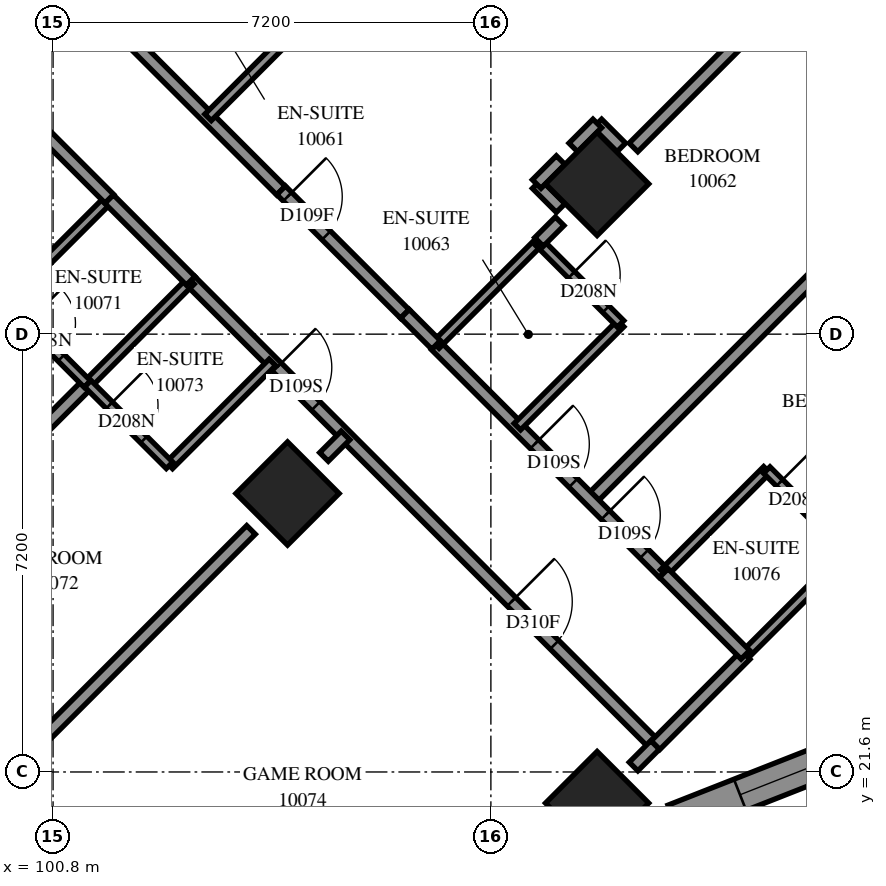
"""IFC4 building model, lengths in metres.
Left out: names, types, materials, properties, quantities, classifications, styles, units other than length and angle.
Written with IfcOpenShell. Run it as: python <this file> out.ifc"""

import sys

from ifc_helpers import new_model, si_unit, direction, frame, frame_2d, origin, origin_2d, place, context, subcontext, project, spatial, polyline, rectangle, outline, extrude, element, fill, save


model = new_model("IFC4")
c1 = context("Model", 3, precision=1e-05, world=origin(), true_north=direction((0.0, 1.0)))
c2 = subcontext(c1, "Body", "Model", "MODEL_VIEW")
j1 = project(units=[si_unit("LENGTHUNIT", "METRE"), si_unit("PLANEANGLEUNIT", "RADIAN")], contexts=[c1])
p1 = place(None, origin())
s1 = spatial("IfcSite", under=j1, at=p1, CompositionType="ELEMENT")
p2 = place(p1, origin())
s2 = spatial("IfcBuilding", under=s1, at=p2, CompositionType="ELEMENT")
p3 = place(p2, frame((0.0, 0.0, 40.6)))
s3 = spatial("IfcBuildingStorey", under=s2, at=p3, CompositionType="ELEMENT", Elevation=40.6)
for number, where, z_axis, x_axis in (
    (1, (109.747, 31.271, 0.0), (0.0, 0.0, 1.0), (0.707, -0.707, 0.0)),
    (2, (104.656, 26.18, 0.0), (0.0, 0.0, 1.0), (0.707, -0.707, 0.0)),
    (3, (109.747, 21.088, 0.0), (0.0, 0.0, 1.0), (0.707, -0.707, 0.0)),
):
    element("IfcColumn", number, at=place(p3, frame(where, z_axis=z_axis, x_axis=x_axis)), inside=s3, PredefinedType="COLUMN", context=c2, shape_type="SweptSolid", body=[
        extrude(rectangle(XDim=1.2, YDim=1.2, at=origin_2d()), origin(), (0.0, 0.0, 1.0), 3.1),
    ])
p4 = place(p3, frame((111.012, 20.798, 0.0), z_axis=(0.0, 0.0, 1.0), x_axis=(0.9305394819, 0.3661915791, 0.0)))
e4 = element("IfcWall", 4, at=p4, inside=s3, PredefinedType="SOLIDWALL", context=c2, shape_type="SweptSolid", body=[
    extrude(outline(polyline([(0.12, -0.275), (5.633, -0.275), (5.383, 0.275), (-0.12, 0.275), (0.12, -0.275)])), origin(), (0.0, 0.0, 1.0), 3.1),
])
p5 = place(p4, frame((1.166, 0.0, 0.5)))
e5 = element("IfcOpeningElement", 5, at=p5, cuts=e4, PredefinedType="OPENING", context=c2, shape_type="SweptSolid", body=[
    extrude(rectangle(XDim=2.8, YDim=2.45, at=frame_2d((1.4, 1.225))), frame((0.0, 0.285, 0.0), z_axis=(0.0, -1.0, 0.0), x_axis=(1.0, 0.0, 0.0)), (0.0, 0.0, 1.0), 0.57),
])
p6 = place(p3, frame((103.061, 29.677, 0.0), z_axis=(0.0, 0.0, 1.0), x_axis=(0.7071067812, -0.7071067812, 0.0)))
e6 = element("IfcWall", 6, at=p6, inside=s3, PredefinedType="PARTITIONING", context=c2, shape_type="SweptSolid", body=[
    extrude(rectangle(XDim=10.802, YDim=0.2, at=frame_2d((5.401, 0.0))), origin(), (0.0, 0.0, 1.0), 3.1),
])
p7 = place(p6, frame((2.012, 0.0, 0.0)))
e7 = element("IfcOpeningElement", 7, at=p7, cuts=e6, PredefinedType="OPENING", context=c2, shape_type="SweptSolid", body=[
    extrude(rectangle(XDim=0.9, YDim=2.1, at=frame_2d((0.45, 1.05))), frame((0.0, 0.11, 0.0), z_axis=(0.0, -1.0, 0.0), x_axis=(1.0, 0.0, 0.0)), (0.0, 0.0, 1.0), 0.22),
])
p8 = place(p6, frame((7.463, 0.0, 0.0)))
e8 = element("IfcOpeningElement", 8, at=p8, cuts=e6, PredefinedType="OPENING", context=c2, shape_type="SweptSolid", body=[
    extrude(rectangle(XDim=1.0, YDim=2.1, at=frame_2d((0.5, 1.05))), frame((0.0, 0.11, 0.0), z_axis=(0.0, -1.0, 0.0), x_axis=(1.0, 0.0, 0.0)), (0.0, 0.0, 1.0), 0.22),
])
p9 = place(p3, frame((99.455, 36.253, 0.0), z_axis=(0.0, 0.0, 1.0), x_axis=(0.7071067812, -0.7071067812, 0.0)))
e9 = element("IfcWall", 9, at=p9, inside=s3, PredefinedType="PARTITIONING", context=c2, shape_type="SweptSolid", body=[
    extrude(rectangle(XDim=7.201, YDim=0.2, at=frame_2d((3.601, 0.0))), origin(), (0.0, 0.0, 1.0), 3.1),
])
p10 = place(p9, frame((0.401, 0.0, 0.0)))
e10 = element("IfcOpeningElement", 10, at=p10, cuts=e9, PredefinedType="OPENING", context=c2, shape_type="SweptSolid", body=[
    extrude(rectangle(XDim=0.9, YDim=2.1, at=frame_2d((0.45, 1.05))), frame((0.0, 0.11, 0.0), z_axis=(0.0, -1.0, 0.0), x_axis=(1.0, 0.0, 0.0)), (0.0, 0.0, 1.0), 0.22),
])
p11 = place(p3, frame((96.532, 23.148, 0.0), z_axis=(0.0, 0.0, 1.0), x_axis=(0.7071140939, 0.7070994684, 0.0)))
e11 = element("IfcWall", 11, at=p11, inside=s3, PredefinedType="PARTITIONING", context=c2, shape_type="SweptSolid", body=[
    extrude(rectangle(XDim=6.837, YDim=0.2, at=frame_2d((3.419, 0.0))), origin(), (0.0, 0.0, 1.0), 3.1),
])
p12 = place(p3, frame((109.64, 26.074, 0.0), z_axis=(0.0, 0.0, 1.0), x_axis=(0.7072538194, 0.7069597124, 0.0)))
e12 = element("IfcWall", 12, at=p12, inside=s3, PredefinedType="PARTITIONING", context=c2, shape_type="SweptSolid", body=[
    extrude(rectangle(XDim=6.8, YDim=0.2, at=frame_2d((3.4, 0.0))), origin(), (0.0, 0.0, 1.0), 3.1),
])
for number, where, z_axis, x_axis in (
    (13, (110.345, 31.871, 0.0), (0.0, 0.0, 1.0), (0.707, 0.707, 0.0)),
    (14, (100.163, 21.689, 0.0), (0.0, 0.0, 1.0), (0.707, 0.707, 0.0)),
):
    element("IfcWall", number, at=place(p3, frame(where, z_axis=z_axis, x_axis=x_axis)), inside=s3, PredefinedType="PARTITIONING", context=c2, shape_type="SweptSolid", body=[
        extrude(rectangle(XDim=5.504, YDim=0.2, at=frame_2d((2.752, 0.0))), origin(), (0.0, 0.0, 1.0), 3.1),
    ])
p13 = place(p3, frame((107.093, 28.615, 0.0), z_axis=(0.0, 0.0, 1.0), x_axis=(0.7072011313, -0.7070124185, 0.0)))
e15 = element("IfcWall", 15, at=p13, inside=s3, PredefinedType="PARTITIONING", context=c2, shape_type="SweptSolid", body=[
    extrude(rectangle(XDim=5.299, YDim=0.2, at=frame_2d((2.65, 0.0))), origin(), (0.0, 0.0, 1.0), 3.1),
])
p14 = place(p13, frame((2.299, 0.0, 0.0)))
e16 = element("IfcOpeningElement", 16, at=p14, cuts=e15, PredefinedType="OPENING", context=c2, shape_type="SweptSolid", body=[
    extrude(rectangle(XDim=0.9, YDim=2.1, at=frame_2d((0.45, 1.05))), frame((0.0, 0.11, 0.0), z_axis=(0.0, -1.0, 0.0), x_axis=(1.0, 0.0, 0.0)), (0.0, 0.0, 1.0), 0.22),
])
p15 = place(p13, frame((3.949, 0.0, 0.0)))
e17 = element("IfcOpeningElement", 17, at=p15, cuts=e15, PredefinedType="OPENING", context=c2, shape_type="SweptSolid", body=[
    extrude(rectangle(XDim=0.9, YDim=2.1, at=frame_2d((0.45, 1.05))), frame((0.0, 0.11, 0.0), z_axis=(0.0, -1.0, 0.0), x_axis=(1.0, 0.0, 0.0)), (0.0, 0.0, 1.0), 0.22),
])
p16 = place(p3, frame((104.551, 31.165, 0.0), z_axis=(0.0, 0.0, 1.0), x_axis=(0.7074545101, -0.7067588812, 0.0)))
e18 = element("IfcWall", 18, at=p16, inside=s3, PredefinedType="PARTITIONING", context=c2, shape_type="SweptSolid", body=[
    extrude(rectangle(XDim=2.875, YDim=0.2, at=frame_2d((1.438, 0.0))), origin(), (0.0, 0.0, 1.0), 3.1),
])
p17 = place(p16, frame((0.148, 0.0, 0.0)))
e19 = element("IfcOpeningElement", 19, at=p17, cuts=e18, PredefinedType="OPENING", context=c2, shape_type="SweptSolid", body=[
    extrude(rectangle(XDim=0.9, YDim=2.1, at=frame_2d((0.45, 1.05))), frame((0.0, 0.11, 0.0), z_axis=(0.0, -1.0, 0.0), x_axis=(1.0, 0.0, 0.0)), (0.0, 0.0, 1.0), 0.22),
])
p18 = place(p3, frame((100.023, 29.327, 0.0), z_axis=(0.0, 0.0, 1.0), x_axis=(0.7071067812, 0.7071067812, 0.0)))
e20 = element("IfcWall", 20, at=p18, inside=s3, PredefinedType="PARTITIONING", context=c2, shape_type="SweptSolid", body=[
    extrude(rectangle(XDim=2.401, YDim=0.15, at=frame_2d((1.201, 0.0))), origin(), (0.0, 0.0, 1.0), 3.1),
])
for number, where, z_axis, x_axis in (
    (21, (101.371, 27.979, 0.0), (0.0, 0.0, 1.0), (0.707, 0.708, 0.0)),
    (22, (108.435, 27.279, 0.0), (0.0, 0.0, 1.0), (0.708, 0.707, 0.0)),
    (23, (103.349, 32.365, 0.0), (0.0, 0.0, 1.0), (0.707, 0.708, 0.0)),
):
    element("IfcWall", number, at=place(p3, frame(where, z_axis=z_axis, x_axis=x_axis)), inside=s3, PredefinedType="PARTITIONING", context=c2, shape_type="SweptSolid", body=[
        extrude(rectangle(XDim=2.4, YDim=0.15, at=frame_2d((1.2, 0.0))), origin(), (0.0, 0.0, 1.0), 3.1),
    ])
p19 = place(p3, frame((112.183, 23.531, 0.0), z_axis=(0.0, 0.0, 1.0), x_axis=(0.7075233388, 0.706689978, 0.0)))
e24 = element("IfcWall", 24, at=p19, inside=s3, PredefinedType="PARTITIONING", context=c2, shape_type="SweptSolid", body=[
    extrude(rectangle(XDim=2.4, YDim=0.15, at=frame_2d((1.2, 0.0))), origin(), (0.0, 0.0, 1.0), 2.6),
])
for number, where, z_axis, x_axis in (
    (25, (102.711, 26.641, 0.0), (0.0, 0.0, 1.0), (0.707, 0.707, 0.0)),
    (26, (107.095, 28.621, 0.0), (0.0, 0.0, 1.0), (0.707, 0.707, 0.0)),
    (27, (110.843, 24.873, 0.0), (0.0, 0.0, 1.0), (0.707, 0.707, 0.0)),
):
    element("IfcWall", number, at=place(p3, frame(where, z_axis=z_axis, x_axis=x_axis)), inside=s3, PredefinedType="PARTITIONING", context=c2, shape_type="SweptSolid", body=[
        extrude(rectangle(XDim=2.398, YDim=0.15, at=frame_2d((1.199, 0.0))), origin(), (0.0, 0.0, 1.0), 3.1),
    ])
p20 = place(p3, frame((110.705, 22.039, 0.0), z_axis=(0.0, 0.0, 1.0), x_axis=(0.7066304548, 0.7075827869, 0.0)))
e28 = element("IfcWall", 28, at=p20, inside=s3, PredefinedType="PARTITIONING", context=c2, shape_type="SweptSolid", body=[
    extrude(rectangle(XDim=2.1, YDim=0.2, at=frame_2d((1.05, 0.0))), origin(), (0.0, 0.0, 1.0), 2.6),
])
p21 = place(p3, frame((100.021, 29.323, 0.0), z_axis=(0.0, 0.0, 1.0), x_axis=(0.7071067812, -0.7071067812, 0.0)))
e29 = element("IfcWall", 29, at=p21, inside=s3, PredefinedType="PARTITIONING", context=c2, shape_type="SweptSolid", body=[
    extrude(rectangle(XDim=1.901, YDim=0.15, at=frame_2d((0.95, 0.0))), origin(), (0.0, 0.0, 1.0), 3.1),
])
p22 = place(p21, frame((0.491, 0.0, 0.0)))
e30 = element("IfcOpeningElement", 30, at=p22, cuts=e29, PredefinedType="OPENING", context=c2, shape_type="SweptSolid", body=[
    extrude(rectangle(XDim=0.8, YDim=2.1, at=frame_2d((0.4, 1.05))), frame((0.0, 0.085, 0.0), z_axis=(0.0, -1.0, 0.0), x_axis=(1.0, 0.0, 0.0)), (0.0, 0.0, 1.0), 0.17),
])
p23 = place(p3, frame((108.789, 30.313, 0.0), z_axis=(0.0, 0.0, 1.0), x_axis=(0.7071067812, -0.7071067812, 0.0)))
e31 = element("IfcWall", 31, at=p23, inside=s3, PredefinedType="PARTITIONING", context=c2, shape_type="SweptSolid", body=[
    extrude(rectangle(XDim=1.901, YDim=0.15, at=frame_2d((0.95, 0.0))), origin(), (0.0, 0.0, 1.0), 3.1),
])
p24 = place(p23, frame((0.76, 0.0, 0.0)))
e32 = element("IfcOpeningElement", 32, at=p24, cuts=e31, PredefinedType="OPENING", context=c2, shape_type="SweptSolid", body=[
    extrude(rectangle(XDim=0.8, YDim=2.1, at=frame_2d((0.4, 1.05))), frame((0.0, 0.085, 0.0), z_axis=(0.0, -1.0, 0.0), x_axis=(1.0, 0.0, 0.0)), (0.0, 0.0, 1.0), 0.17),
])
p25 = place(p3, frame((112.537, 26.565, 0.0), z_axis=(0.0, 0.0, 1.0), x_axis=(0.7071067812, -0.7071067812, 0.0)))
e33 = element("IfcWall", 33, at=p25, inside=s3, PredefinedType="PARTITIONING", context=c2, shape_type="SweptSolid", body=[
    extrude(rectangle(XDim=1.901, YDim=0.15, at=frame_2d((0.95, 0.0))), origin(), (0.0, 0.0, 1.0), 3.1),
])
p26 = place(p25, frame((0.297, 0.0, 0.0)))
e34 = element("IfcOpeningElement", 34, at=p26, cuts=e33, PredefinedType="OPENING", context=c2, shape_type="SweptSolid", body=[
    extrude(rectangle(XDim=0.8, YDim=2.1, at=frame_2d((0.4, 1.05))), frame((0.0, 0.085, 0.0), z_axis=(0.0, -1.0, 0.0), x_axis=(1.0, 0.0, 0.0)), (0.0, 0.0, 1.0), 0.17),
])
p27 = place(p3, frame((110.843, 24.871, 0.0), z_axis=(0.0, 0.0, 1.0), x_axis=(0.7065800724, -0.7076330979, 0.0)))
e35 = element("IfcWall", 35, at=p27, inside=s3, PredefinedType="PARTITIONING", context=c2, shape_type="SweptSolid", body=[
    extrude(rectangle(XDim=1.899, YDim=0.2, at=frame_2d((0.95, 0.0))), origin(), (0.0, 0.0, 1.0), 3.1),
])
p28 = place(p3, frame((101.371, 27.985, 0.0), z_axis=(0.0, 0.0, 1.0), x_axis=(0.7076330979, -0.7065800724, 0.0)))
e36 = element("IfcWall", 36, at=p28, inside=s3, PredefinedType="PARTITIONING", context=c2, shape_type="SweptSolid", body=[
    extrude(rectangle(XDim=1.899, YDim=0.15, at=frame_2d((0.95, 0.0))), origin(), (0.0, 0.0, 1.0), 3.1),
])
p29 = place(p28, frame((0.501, 0.0, 0.0)))
e37 = element("IfcOpeningElement", 37, at=p29, cuts=e36, PredefinedType="OPENING", context=c2, shape_type="SweptSolid", body=[
    extrude(rectangle(XDim=0.8, YDim=2.1, at=frame_2d((0.4, 1.05))), frame((0.0, 0.085, 0.0), z_axis=(0.0, -1.0, 0.0), x_axis=(1.0, 0.0, 0.0)), (0.0, 0.0, 1.0), 0.17),
])
p30 = place(p3, frame((101.72, 31.022, 0.0), z_axis=(0.0, 0.0, 1.0), x_axis=(0.7065800724, -0.7076330979, 0.0)))
e38 = element("IfcWall", 38, at=p30, inside=s3, PredefinedType="PARTITIONING", context=c2, shape_type="SweptSolid", body=[
    extrude(rectangle(XDim=1.899, YDim=0.2, at=frame_2d((0.95, 0.0))), origin(), (0.0, 0.0, 1.0), 3.1),
])
p31 = place(p3, frame((100.523, 32.229, 0.0), z_axis=(0.0, 0.0, 1.0), x_axis=(0.7071067812, -0.7071067812, 0.0)))
e39 = element("IfcWall", 39, at=p31, inside=s3, PredefinedType="PARTITIONING", context=c2, shape_type="SweptSolid", body=[
    extrude(rectangle(XDim=1.7, YDim=0.2, at=frame_2d((0.85, 0.0))), origin(), (0.0, 0.0, 1.0), 3.1),
])
p32 = place(p3, frame((106.587, 29.135, 0.0), z_axis=(0.0, 0.0, 1.0), x_axis=(0.7071067812, -0.7071067812, 0.0)))
e40 = element("IfcWall", 40, at=p32, inside=s3, PredefinedType="PARTITIONING", context=c2, shape_type="SweptSolid", body=[
    extrude(rectangle(XDim=0.724, YDim=0.2, at=frame_2d((0.362, 0.0))), origin(), (0.0, 0.0, 1.0), 3.1),
])
for number, where, z_axis, x_axis in (
    (41, (108.754, 31.268, 0.0), (0.0, 0.0, 1.0), (0.707, -0.707, 0.0)),
    (42, (109.751, 32.265, 0.0), (0.0, 0.0, 1.0), (0.707, -0.707, 0.0)),
    (43, (109.355, 31.871, 0.0), (0.0, 0.0, 1.0), (0.707, 0.707, 0.0)),
    (44, (108.753, 31.269, 0.0), (0.0, 0.0, 1.0), (0.707, 0.707, 0.0)),
):
    element("IfcWall", number, at=place(p3, frame(where, z_axis=z_axis, x_axis=x_axis)), inside=s3, PredefinedType="PARTITIONING", context=c2, shape_type="SweptSolid", body=[
        extrude(rectangle(XDim=0.557, YDim=0.2, at=frame_2d((0.279, 0.0))), origin(), (0.0, 0.0, 1.0), 3.1),
    ])
p33 = place(p3, frame((105.255, 26.781, 0.0), z_axis=(0.0, 0.0, 1.0), x_axis=(0.7071067812, 0.7071067812, 0.0)))
e45 = element("IfcWall", 45, at=p33, inside=s3, PredefinedType="PARTITIONING", context=c2, shape_type="SweptSolid", body=[
    extrude(rectangle(XDim=0.501, YDim=0.2, at=frame_2d((0.25, 0.0))), origin(), (0.0, 0.0, 1.0), 3.1),
])
p34 = place(p3, frame((110.347, 21.689, 0.0), z_axis=(0.0, 0.0, 1.0), x_axis=(0.7071067812, 0.7071067812, 0.0)))
e46 = element("IfcWall", 46, at=p34, inside=s3, PredefinedType="PARTITIONING", context=c2, shape_type="SweptSolid", body=[
    extrude(rectangle(XDim=0.501, YDim=0.2, at=frame_2d((0.25, 0.0))), origin(), (0.0, 0.0, 1.0), 2.6),
])
p35 = place(p3, frame((108.791, 30.317, 0.0), z_axis=(0.0, 0.0, 1.0), x_axis=(0.7071067812, 0.7071067812, 0.0)))
e47 = element("IfcWall", 47, at=p35, inside=s3, PredefinedType="PARTITIONING", context=c2, shape_type="SweptSolid", body=[
    extrude(rectangle(XDim=0.481, YDim=0.2, at=frame_2d((0.24, 0.0))), origin(), (0.0, 0.0, 1.0), 3.1),
])
p36 = place(p5, origin())
e48 = element("IfcWindow", 48, at=p36, inside=s3, PartitioningType="SINGLE_PANEL", PredefinedType="WINDOW", context=c2, shape_type="SweptSolid", body=[
    extrude(rectangle(XDim=2.8, YDim=2.45, at=frame_2d((1.4, 1.225))), frame((0.0, 0.155, 0.0), z_axis=(0.0, -1.0, 0.0), x_axis=(1.0, 0.0, 0.0)), (0.0, 0.0, 1.0), 0.06),
])
fill(e5, e48)
p37 = place(p17, origin())
e49 = element("IfcDoor", 49, at=p37, inside=s3, OperationType="SINGLE_SWING_LEFT", PredefinedType="DOOR", context=c2, shape_type="SweptSolid", body=[
    extrude(rectangle(XDim=0.9, YDim=2.1, at=frame_2d((0.45, 1.05))), frame((0.0, 0.025, 0.0), z_axis=(0.0, -1.0, 0.0), x_axis=(1.0, 0.0, 0.0)), (0.0, 0.0, 1.0), 0.05),
])
fill(e19, e49)
p38 = place(p14, origin())
e50 = element("IfcDoor", 50, at=p38, inside=s3, OperationType="SINGLE_SWING_LEFT", PredefinedType="DOOR", context=c2, shape_type="SweptSolid", body=[
    extrude(rectangle(XDim=0.9, YDim=2.1, at=frame_2d((0.45, 1.05))), frame((0.0, 0.025, 0.0), z_axis=(0.0, -1.0, 0.0), x_axis=(1.0, 0.0, 0.0)), (0.0, 0.0, 1.0), 0.05),
])
fill(e16, e50)
p39 = place(p24, origin())
e51 = element("IfcDoor", 51, at=p39, inside=s3, OperationType="SINGLE_SWING_RIGHT", PredefinedType="DOOR", context=c2, shape_type="SweptSolid", body=[
    extrude(rectangle(XDim=0.8, YDim=2.1, at=frame_2d((0.4, 1.05))), frame((0.0, 0.025, 0.0), z_axis=(0.0, -1.0, 0.0), x_axis=(1.0, 0.0, 0.0)), (0.0, 0.0, 1.0), 0.05),
])
fill(e32, e51)
p40 = place(p22, origin())
e52 = element("IfcDoor", 52, at=p40, inside=s3, OperationType="SINGLE_SWING_RIGHT", PredefinedType="DOOR", context=c2, shape_type="SweptSolid", body=[
    extrude(rectangle(XDim=0.8, YDim=2.1, at=frame_2d((0.4, 1.05))), frame((0.0, 0.025, 0.0), z_axis=(0.0, -1.0, 0.0), x_axis=(1.0, 0.0, 0.0)), (0.0, 0.0, 1.0), 0.05),
])
fill(e30, e52)
p41 = place(p7, origin())
e53 = element("IfcDoor", 53, at=p41, inside=s3, OperationType="SINGLE_SWING_LEFT", PredefinedType="DOOR", context=c2, shape_type="SweptSolid", body=[
    extrude(rectangle(XDim=0.9, YDim=2.1, at=frame_2d((0.45, 1.05))), frame((0.0, 0.025, 0.0), z_axis=(0.0, -1.0, 0.0), x_axis=(1.0, 0.0, 0.0)), (0.0, 0.0, 1.0), 0.05),
])
fill(e7, e53)
p42 = place(p29, origin())
e54 = element("IfcDoor", 54, at=p42, inside=s3, OperationType="SINGLE_SWING_RIGHT", PredefinedType="DOOR", context=c2, shape_type="SweptSolid", body=[
    extrude(rectangle(XDim=0.8, YDim=2.1, at=frame_2d((0.4, 1.05))), frame((0.0, 0.025, 0.0), z_axis=(0.0, -1.0, 0.0), x_axis=(1.0, 0.0, 0.0)), (0.0, 0.0, 1.0), 0.05),
])
fill(e37, e54)
p43 = place(p8, origin())
e55 = element("IfcDoor", 55, at=p43, inside=s3, OperationType="SINGLE_SWING_RIGHT", PredefinedType="DOOR", context=c2, shape_type="SweptSolid", body=[
    extrude(rectangle(XDim=1.0, YDim=2.1, at=frame_2d((0.5, 1.05))), frame((0.0, 0.025, 0.0), z_axis=(0.0, -1.0, 0.0), x_axis=(1.0, 0.0, 0.0)), (0.0, 0.0, 1.0), 0.05),
])
fill(e8, e55)
p44 = place(p15, origin())
e56 = element("IfcDoor", 56, at=p44, inside=s3, OperationType="SINGLE_SWING_RIGHT", PredefinedType="DOOR", context=c2, shape_type="SweptSolid", body=[
    extrude(rectangle(XDim=0.9, YDim=2.1, at=frame_2d((0.45, 1.05))), frame((0.0, 0.025, 0.0), z_axis=(0.0, -1.0, 0.0), x_axis=(1.0, 0.0, 0.0)), (0.0, 0.0, 1.0), 0.05),
])
fill(e17, e56)
p45 = place(p26, origin())
e57 = element("IfcDoor", 57, at=p45, inside=s3, OperationType="SINGLE_SWING_RIGHT", PredefinedType="DOOR", context=c2, shape_type="SweptSolid", body=[
    extrude(rectangle(XDim=0.8, YDim=2.1, at=frame_2d((0.4, 1.05))), frame((0.0, 0.025, 0.0), z_axis=(0.0, -1.0, 0.0), x_axis=(1.0, 0.0, 0.0)), (0.0, 0.0, 1.0), 0.05),
])
fill(e34, e57)
save(model, sys.argv[1])
